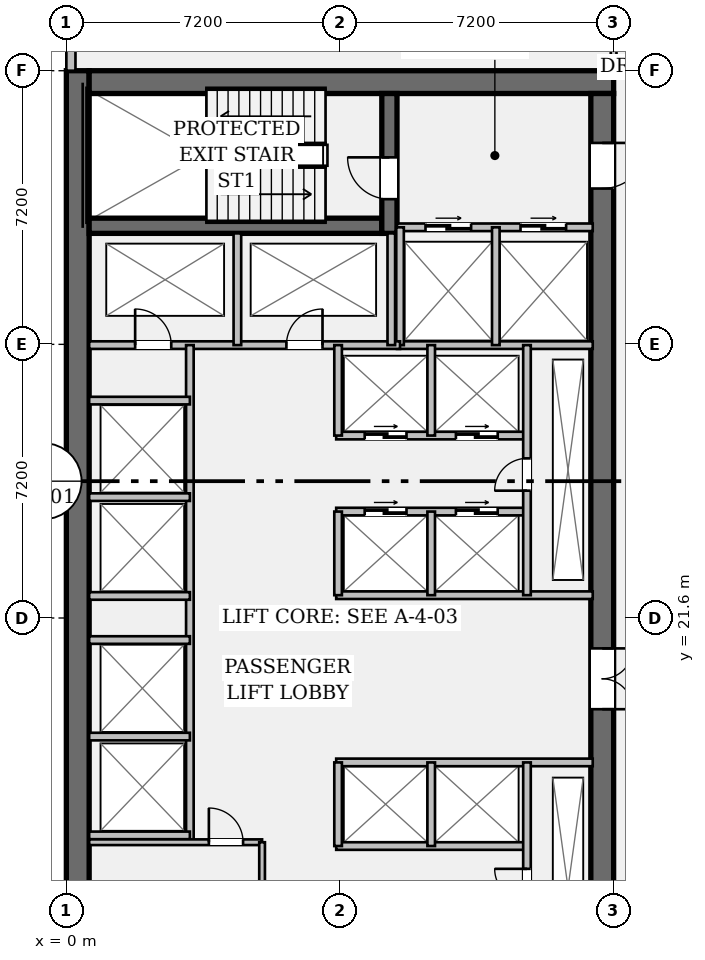
"""IFC4 building model, lengths in metres.
Left out: names, types, materials, properties, quantities, classifications, styles, units other than length and angle.
Written with IfcOpenShell. Run it as: python <this file> out.ifc"""

import sys

from ifc_helpers import new_model, si_unit, direction, frame, frame_2d, origin, place, context, subcontext, project, spatial, rectangle, extrude, element, fill, save


model = new_model("IFC4")
c1 = context("Model", 3, precision=1e-05, world=origin(), true_north=direction((0.0, 1.0)))
c2 = subcontext(c1, "Body", "Model", "MODEL_VIEW")
j1 = project(units=[si_unit("LENGTHUNIT", "METRE"), si_unit("PLANEANGLEUNIT", "RADIAN")], contexts=[c1])
p1 = place(None, origin())
s1 = spatial("IfcSite", under=j1, at=p1, CompositionType="ELEMENT")
p2 = place(p1, origin())
s2 = spatial("IfcBuilding", under=s1, at=p2, CompositionType="ELEMENT")
p3 = place(p2, frame((0.0, 0.0, 17.85)))
s3 = spatial("IfcBuildingStorey", under=s2, at=p3, CompositionType="ELEMENT", Elevation=17.85)
p4 = place(p3, frame((0.3, 7.2, 0.0), z_axis=(0.0, 0.0, 1.0), x_axis=(0.0, 1.0, 0.0)))
e1 = element("IfcWall", 1, at=p4, inside=s3, PredefinedType="SHEAR", context=c2, shape_type="SweptSolid", body=[
    extrude(rectangle(XDim=28.8, YDim=0.6, at=frame_2d((14.4, 0.0))), origin(), (0.0, 0.0, 1.0), 3.91),
])
p5 = place(p3, frame((0.6, 35.7, 0.0), z_axis=(0.0, 0.0, 1.0), x_axis=(1.0, 0.0, 0.0)))
e2 = element("IfcWall", 2, at=p5, inside=s3, PredefinedType="SHEAR", context=c2, shape_type="SweptSolid", body=[
    extrude(rectangle(XDim=13.8, YDim=0.6, at=frame_2d((6.9, 0.0))), origin(), (0.0, 0.0, 1.0), 3.91),
])
p6 = place(p3, frame((14.1, 35.4, 0.0), z_axis=(0.0, 0.0, 1.0), x_axis=(0.0, -1.0, 0.0)))
e3 = element("IfcWall", 3, at=p6, inside=s3, PredefinedType="SHEAR", context=c2, shape_type="SweptSolid", body=[
    extrude(rectangle(XDim=27.6, YDim=0.6, at=frame_2d((13.8, 0.0))), origin(), (0.0, 0.0, 1.0), 3.91),
])
p7 = place(p6, frame((1.3, 0.0, 0.0)))
e4 = element("IfcOpeningElement", 4, at=p7, cuts=e3, PredefinedType="OPENING", context=c2, shape_type="SweptSolid", body=[
    extrude(rectangle(XDim=1.2, YDim=2.15, at=frame_2d((0.6, 1.075))), frame((0.0, 0.312, 0.0), z_axis=(0.0, -1.0, 0.0), x_axis=(1.0, 0.0, 0.0)), (0.0, 0.0, 1.0), 0.624),
])
p8 = place(p6, frame((25.25, 0.0, 0.0)))
e5 = element("IfcOpeningElement", 5, at=p8, cuts=e3, PredefinedType="OPENING", context=c2, shape_type="SweptSolid", body=[
    extrude(rectangle(XDim=1.2, YDim=2.15, at=frame_2d((0.6, 1.075))), frame((0.0, 0.312, 0.0), z_axis=(0.0, -1.0, 0.0), x_axis=(1.0, 0.0, 0.0)), (0.0, 0.0, 1.0), 0.624),
])
p9 = place(p6, frame((14.6, 0.0, 0.0)))
e6 = element("IfcOpeningElement", 6, at=p9, cuts=e3, PredefinedType="OPENING", context=c2, shape_type="SweptSolid", body=[
    extrude(rectangle(XDim=1.6, YDim=2.2, at=frame_2d((0.8, 1.1))), frame((0.0, 0.312, 0.0), z_axis=(0.0, -1.0, 0.0), x_axis=(1.0, 0.0, 0.0)), (0.0, 0.0, 1.0), 0.624),
])
p10 = place(p3, frame((0.6, 31.92, 0.0), z_axis=(0.0, 0.0, 1.0), x_axis=(1.0, 0.0, 0.0)))
e7 = element("IfcWall", 7, at=p10, inside=s3, PredefinedType="SHEAR", context=c2, shape_type="SweptSolid", body=[
    extrude(rectangle(XDim=7.7, YDim=0.4, at=frame_2d((3.85, 0.0))), origin(), (0.0, 0.0, 1.0), 3.91),
])
p11 = place(p3, frame((8.5, 31.72, 0.0), z_axis=(0.0, 0.0, 1.0), x_axis=(0.0, 1.0, 0.0)))
e8 = element("IfcWall", 8, at=p11, inside=s3, PredefinedType="SHEAR", context=c2, shape_type="SweptSolid", body=[
    extrude(rectangle(XDim=3.68, YDim=0.4, at=frame_2d((1.84, 0.0))), origin(), (0.0, 0.0, 1.0), 3.91),
])
p12 = place(p11, frame((0.9, 0.0, 0.0)))
e9 = element("IfcOpeningElement", 9, at=p12, cuts=e8, PredefinedType="OPENING", context=c2, shape_type="SweptSolid", body=[
    extrude(rectangle(XDim=1.1, YDim=2.15, at=frame_2d((0.55, 1.075))), frame((0.0, 0.212, 0.0), z_axis=(0.0, -1.0, 0.0), x_axis=(1.0, 0.0, 0.0)), (0.0, 0.0, 1.0), 0.424),
])
p13 = place(p3, frame((0.12, 36.0, 0.0), z_axis=(0.0, 0.0, 1.0), x_axis=(0.0, 1.0, 0.0)))
e10 = element("IfcWall", 10, at=p13, inside=s3, PredefinedType="STANDARD", context=c2, shape_type="SweptSolid", body=[
    extrude(rectangle(XDim=11.58, YDim=0.24, at=frame_2d((5.79, 0.0))), origin(), (0.0, 0.0, 1.0), 3.91),
])
p14 = place(p13, frame((4.29, 0.0, 0.95)))
e11 = element("IfcOpeningElement", 11, at=p14, cuts=e10, PredefinedType="OPENING", context=c2, shape_type="SweptSolid", body=[
    extrude(rectangle(XDim=3.0, YDim=1.5, at=frame_2d((1.5, 0.75))), frame((0.0, 0.132, 0.0), z_axis=(0.0, -1.0, 0.0), x_axis=(1.0, 0.0, 0.0)), (0.0, 0.0, 1.0), 0.264),
])
p15 = place(p3, frame((8.7, 31.88, 0.0), z_axis=(0.0, 0.0, 1.0), x_axis=(1.0, 0.0, 0.0)))
e12 = element("IfcWall", 12, at=p15, inside=s3, PredefinedType="PARTITIONING", context=c2, shape_type="SweptSolid", body=[
    extrude(rectangle(XDim=5.15, YDim=0.2, at=frame_2d((2.575, 0.0))), origin(), (0.0, 0.0, 1.0), 3.91),
])
p16 = place(p15, frame((0.75, 0.0, 0.0)))
e13 = element("IfcOpeningElement", 13, at=p16, cuts=e12, PredefinedType="OPENING", context=c2, shape_type="SweptSolid", body=[
    extrude(rectangle(XDim=1.2, YDim=2.2, at=frame_2d((0.6, 1.1))), frame((0.0, 0.112, 0.0), z_axis=(0.0, -1.0, 0.0), x_axis=(1.0, 0.0, 0.0)), (0.0, 0.0, 1.0), 0.224),
])
p17 = place(p15, frame((3.25, 0.0, 0.0)))
e14 = element("IfcOpeningElement", 14, at=p17, cuts=e12, PredefinedType="OPENING", context=c2, shape_type="SweptSolid", body=[
    extrude(rectangle(XDim=1.2, YDim=2.2, at=frame_2d((0.6, 1.1))), frame((0.0, 0.112, 0.0), z_axis=(0.0, -1.0, 0.0), x_axis=(1.0, 0.0, 0.0)), (0.0, 0.0, 1.0), 0.224),
])
p18 = place(p3, frame((8.7, 28.78, 0.0), z_axis=(0.0, 0.0, 1.0), x_axis=(1.0, 0.0, 0.0)))
e15 = element("IfcWall", 15, at=p18, inside=s3, PredefinedType="PARTITIONING", context=c2, shape_type="SweptSolid", body=[
    extrude(rectangle(XDim=5.15, YDim=0.2, at=frame_2d((2.575, 0.0))), origin(), (0.0, 0.0, 1.0), 3.91),
])
for number, where, z_axis, x_axis in (
    (16, (8.78, 28.78, 0.0), (0.0, 0.0, 1.0), (0.0, 1.0, 0.0)),
    (17, (11.3, 28.78, 0.0), (0.0, 0.0, 1.0), (0.0, 1.0, 0.0)),
):
    element("IfcWall", number, at=place(p3, frame(where, z_axis=z_axis, x_axis=x_axis)), inside=s3, PredefinedType="PARTITIONING", context=c2, shape_type="SweptSolid", body=[
        extrude(rectangle(XDim=3.1, YDim=0.2, at=frame_2d((1.55, 0.0))), origin(), (0.0, 0.0, 1.0), 3.91),
    ])
p19 = place(p3, frame((0.6, 28.78, 0.0), z_axis=(0.0, 0.0, 1.0), x_axis=(1.0, 0.0, 0.0)))
e18 = element("IfcWall", 18, at=p19, inside=s3, PredefinedType="PARTITIONING", context=c2, shape_type="SweptSolid", body=[
    extrude(rectangle(XDim=8.18, YDim=0.2, at=frame_2d((4.09, 0.0))), origin(), (0.0, 0.0, 1.0), 3.91),
])
p20 = place(p19, frame((1.21, 0.0, 0.0)))
e19 = element("IfcOpeningElement", 19, at=p20, cuts=e18, PredefinedType="OPENING", context=c2, shape_type="SweptSolid", body=[
    extrude(rectangle(XDim=0.95, YDim=2.15, at=frame_2d((0.475, 1.075))), frame((0.0, 0.112, 0.0), z_axis=(0.0, -1.0, 0.0), x_axis=(1.0, 0.0, 0.0)), (0.0, 0.0, 1.0), 0.224),
])
p21 = place(p19, frame((5.19, 0.0, 0.0)))
e20 = element("IfcOpeningElement", 20, at=p21, cuts=e18, PredefinedType="OPENING", context=c2, shape_type="SweptSolid", body=[
    extrude(rectangle(XDim=0.95, YDim=2.15, at=frame_2d((0.475, 1.075))), frame((0.0, 0.112, 0.0), z_axis=(0.0, -1.0, 0.0), x_axis=(1.0, 0.0, 0.0)), (0.0, 0.0, 1.0), 0.224),
])
for number, where, z_axis, x_axis in (
    (21, (4.5, 28.78, 0.0), (0.0, 0.0, 1.0), (0.0, 1.0, 0.0)),
    (22, (8.55, 28.78, 0.0), (0.0, 0.0, 1.0), (0.0, 1.0, 0.0)),
):
    element("IfcWall", number, at=place(p3, frame(where, z_axis=z_axis, x_axis=x_axis)), inside=s3, PredefinedType="PARTITIONING", context=c2, shape_type="SweptSolid", body=[
        extrude(rectangle(XDim=2.94, YDim=0.2, at=frame_2d((1.47, 0.0))), origin(), (0.0, 0.0, 1.0), 3.91),
    ])
p22 = place(p3, frame((3.25, 15.7, 0.0), z_axis=(0.0, 0.0, 1.0), x_axis=(0.0, 1.0, 0.0)))
e23 = element("IfcWall", 23, at=p22, inside=s3, PredefinedType="PARTITIONING", context=c2, shape_type="SweptSolid", body=[
    extrude(rectangle(XDim=13.08, YDim=0.2, at=frame_2d((6.54, 0.0))), origin(), (0.0, 0.0, 1.0), 3.91),
])
for number, where, z_axis, x_axis in (
    (24, (0.6, 15.88, 0.0), (0.0, 0.0, 1.0), (1.0, 0.0, 0.0)),
    (25, (0.6, 18.48, 0.0), (0.0, 0.0, 1.0), (1.0, 0.0, 0.0)),
    (26, (0.6, 22.18, 0.0), (0.0, 0.0, 1.0), (1.0, 0.0, 0.0)),
    (27, (0.6, 24.78, 0.0), (0.0, 0.0, 1.0), (1.0, 0.0, 0.0)),
    (28, (0.6, 21.02, 0.0), (0.0, 0.0, 1.0), (1.0, 0.0, 0.0)),
    (29, (0.6, 27.32, 0.0), (0.0, 0.0, 1.0), (1.0, 0.0, 0.0)),
):
    element("IfcWall", number, at=place(p3, frame(where, z_axis=z_axis, x_axis=x_axis)), inside=s3, PredefinedType="PARTITIONING", context=c2, shape_type="SweptSolid", body=[
        extrude(rectangle(XDim=2.65, YDim=0.2, at=frame_2d((1.325, 0.0))), origin(), (0.0, 0.0, 1.0), 3.91),
    ])
p23 = place(p3, frame((7.1, 22.2, 0.0), z_axis=(0.0, 0.0, 1.0), x_axis=(1.0, 0.0, 0.0)))
e30 = element("IfcWall", 30, at=p23, inside=s3, PredefinedType="PARTITIONING", context=c2, shape_type="SweptSolid", body=[
    extrude(rectangle(XDim=6.75, YDim=0.2, at=frame_2d((3.375, 0.0))), origin(), (0.0, 0.0, 1.0), 3.91),
])
p24 = place(p3, frame((7.1, 24.4, 0.0), z_axis=(0.0, 0.0, 1.0), x_axis=(1.0, 0.0, 0.0)))
e31 = element("IfcWall", 31, at=p24, inside=s3, PredefinedType="PARTITIONING", context=c2, shape_type="SweptSolid", body=[
    extrude(rectangle(XDim=5.02, YDim=0.2, at=frame_2d((2.51, 0.0))), origin(), (0.0, 0.0, 1.0), 3.91),
])
p25 = place(p24, frame((0.75, 0.0, 0.0)))
e32 = element("IfcOpeningElement", 32, at=p25, cuts=e31, PredefinedType="OPENING", context=c2, shape_type="SweptSolid", body=[
    extrude(rectangle(XDim=1.1, YDim=2.2, at=frame_2d((0.55, 1.1))), frame((0.0, 0.112, 0.0), z_axis=(0.0, -1.0, 0.0), x_axis=(1.0, 0.0, 0.0)), (0.0, 0.0, 1.0), 0.224),
])
p26 = place(p24, frame((3.15, 0.0, 0.0)))
e33 = element("IfcOpeningElement", 33, at=p26, cuts=e31, PredefinedType="OPENING", context=c2, shape_type="SweptSolid", body=[
    extrude(rectangle(XDim=1.1, YDim=2.2, at=frame_2d((0.55, 1.1))), frame((0.0, 0.112, 0.0), z_axis=(0.0, -1.0, 0.0), x_axis=(1.0, 0.0, 0.0)), (0.0, 0.0, 1.0), 0.224),
])
p27 = place(p3, frame((7.1, 26.4, 0.0), z_axis=(0.0, 0.0, 1.0), x_axis=(1.0, 0.0, 0.0)))
e34 = element("IfcWall", 34, at=p27, inside=s3, PredefinedType="PARTITIONING", context=c2, shape_type="SweptSolid", body=[
    extrude(rectangle(XDim=5.02, YDim=0.2, at=frame_2d((2.51, 0.0))), origin(), (0.0, 0.0, 1.0), 3.91),
])
p28 = place(p27, frame((0.75, 0.0, 0.0)))
e35 = element("IfcOpeningElement", 35, at=p28, cuts=e34, PredefinedType="OPENING", context=c2, shape_type="SweptSolid", body=[
    extrude(rectangle(XDim=1.1, YDim=2.2, at=frame_2d((0.55, 1.1))), frame((0.0, 0.112, 0.0), z_axis=(0.0, -1.0, 0.0), x_axis=(1.0, 0.0, 0.0)), (0.0, 0.0, 1.0), 0.224),
])
p29 = place(p27, frame((3.15, 0.0, 0.0)))
e36 = element("IfcOpeningElement", 36, at=p29, cuts=e34, PredefinedType="OPENING", context=c2, shape_type="SweptSolid", body=[
    extrude(rectangle(XDim=1.1, YDim=2.2, at=frame_2d((0.55, 1.1))), frame((0.0, 0.112, 0.0), z_axis=(0.0, -1.0, 0.0), x_axis=(1.0, 0.0, 0.0)), (0.0, 0.0, 1.0), 0.224),
])
p30 = place(p3, frame((7.15, 22.2, 0.0), z_axis=(0.0, 0.0, 1.0), x_axis=(0.0, 1.0, 0.0)))
e37 = element("IfcWall", 37, at=p30, inside=s3, PredefinedType="PARTITIONING", context=c2, shape_type="SweptSolid", body=[
    extrude(rectangle(XDim=2.2, YDim=0.2, at=frame_2d((1.1, 0.0))), origin(), (0.0, 0.0, 1.0), 3.91),
])
p31 = place(p3, frame((7.15, 26.4, 0.0), z_axis=(0.0, 0.0, 1.0), x_axis=(0.0, 1.0, 0.0)))
e38 = element("IfcWall", 38, at=p31, inside=s3, PredefinedType="PARTITIONING", context=c2, shape_type="SweptSolid", body=[
    extrude(rectangle(XDim=2.38, YDim=0.2, at=frame_2d((1.19, 0.0))), origin(), (0.0, 0.0, 1.0), 3.91),
])
p32 = place(p3, frame((9.6, 22.2, 0.0), z_axis=(0.0, 0.0, 1.0), x_axis=(0.0, 1.0, 0.0)))
e39 = element("IfcWall", 39, at=p32, inside=s3, PredefinedType="PARTITIONING", context=c2, shape_type="SweptSolid", body=[
    extrude(rectangle(XDim=2.2, YDim=0.2, at=frame_2d((1.1, 0.0))), origin(), (0.0, 0.0, 1.0), 3.91),
])
p33 = place(p3, frame((9.6, 26.4, 0.0), z_axis=(0.0, 0.0, 1.0), x_axis=(0.0, 1.0, 0.0)))
e40 = element("IfcWall", 40, at=p33, inside=s3, PredefinedType="PARTITIONING", context=c2, shape_type="SweptSolid", body=[
    extrude(rectangle(XDim=2.38, YDim=0.2, at=frame_2d((1.19, 0.0))), origin(), (0.0, 0.0, 1.0), 3.91),
])
p34 = place(p3, frame((12.12, 22.2, 0.0), z_axis=(0.0, 0.0, 1.0), x_axis=(0.0, 1.0, 0.0)))
e41 = element("IfcWall", 41, at=p34, inside=s3, PredefinedType="PARTITIONING", context=c2, shape_type="SweptSolid", body=[
    extrude(rectangle(XDim=6.58, YDim=0.2, at=frame_2d((3.29, 0.0))), origin(), (0.0, 0.0, 1.0), 3.91),
])
p35 = place(p34, frame((2.75, 0.0, 0.0)))
e42 = element("IfcOpeningElement", 42, at=p35, cuts=e41, PredefinedType="OPENING", context=c2, shape_type="SweptSolid", body=[
    extrude(rectangle(XDim=0.85, YDim=2.15, at=frame_2d((0.425, 1.075))), frame((0.0, 0.112, 0.0), z_axis=(0.0, -1.0, 0.0), x_axis=(1.0, 0.0, 0.0)), (0.0, 0.0, 1.0), 0.224),
])
p36 = place(p3, frame((7.1, 17.8, 0.0), z_axis=(0.0, 0.0, 1.0), x_axis=(1.0, 0.0, 0.0)))
e43 = element("IfcWall", 43, at=p36, inside=s3, PredefinedType="PARTITIONING", context=c2, shape_type="SweptSolid", body=[
    extrude(rectangle(XDim=6.75, YDim=0.2, at=frame_2d((3.375, 0.0))), origin(), (0.0, 0.0, 1.0), 3.91),
])
p37 = place(p3, frame((7.1, 15.6, 0.0), z_axis=(0.0, 0.0, 1.0), x_axis=(1.0, 0.0, 0.0)))
e44 = element("IfcWall", 44, at=p37, inside=s3, PredefinedType="PARTITIONING", context=c2, shape_type="SweptSolid", body=[
    extrude(rectangle(XDim=5.02, YDim=0.2, at=frame_2d((2.51, 0.0))), origin(), (0.0, 0.0, 1.0), 3.91),
])
for number, where, z_axis, x_axis in (
    (45, (7.15, 15.6, 0.0), (0.0, 0.0, 1.0), (0.0, 1.0, 0.0)),
    (46, (9.6, 15.6, 0.0), (0.0, 0.0, 1.0), (0.0, 1.0, 0.0)),
):
    element("IfcWall", number, at=place(p3, frame(where, z_axis=z_axis, x_axis=x_axis)), inside=s3, PredefinedType="PARTITIONING", context=c2, shape_type="SweptSolid", body=[
        extrude(rectangle(XDim=2.2, YDim=0.2, at=frame_2d((1.1, 0.0))), origin(), (0.0, 0.0, 1.0), 3.91),
    ])
p38 = place(p3, frame((12.12, 11.2, 0.0), z_axis=(0.0, 0.0, 1.0), x_axis=(0.0, 1.0, 0.0)))
e47 = element("IfcWall", 47, at=p38, inside=s3, PredefinedType="PARTITIONING", context=c2, shape_type="SweptSolid", body=[
    extrude(rectangle(XDim=6.6, YDim=0.2, at=frame_2d((3.3, 0.0))), origin(), (0.0, 0.0, 1.0), 3.91),
])
p39 = place(p38, frame((2.95, 0.0, 0.0)))
e48 = element("IfcOpeningElement", 48, at=p39, cuts=e47, PredefinedType="OPENING", context=c2, shape_type="SweptSolid", body=[
    extrude(rectangle(XDim=0.85, YDim=2.15, at=frame_2d((0.425, 1.075))), frame((0.0, 0.112, 0.0), z_axis=(0.0, -1.0, 0.0), x_axis=(1.0, 0.0, 0.0)), (0.0, 0.0, 1.0), 0.224),
])
p40 = place(p3, frame((0.6, 15.7, 0.0), z_axis=(0.0, 0.0, 1.0), x_axis=(1.0, 0.0, 0.0)))
e49 = element("IfcWall", 49, at=p40, inside=s3, PredefinedType="PARTITIONING", context=c2, shape_type="SweptSolid", body=[
    extrude(rectangle(XDim=4.55, YDim=0.15, at=frame_2d((2.275, 0.0))), origin(), (0.0, 0.0, 1.0), 3.91),
])
p41 = place(p40, frame((3.15, 0.0, 0.0)))
e50 = element("IfcOpeningElement", 50, at=p41, cuts=e49, PredefinedType="OPENING", context=c2, shape_type="SweptSolid", body=[
    extrude(rectangle(XDim=0.9, YDim=2.15, at=frame_2d((0.45, 1.075))), frame((0.0, 0.087, 0.0), z_axis=(0.0, -1.0, 0.0), x_axis=(1.0, 0.0, 0.0)), (0.0, 0.0, 1.0), 0.174),
])
p42 = place(p3, frame((5.15, 11.28, 0.0), z_axis=(0.0, 0.0, 1.0), x_axis=(0.0, 1.0, 0.0)))
e51 = element("IfcWall", 51, at=p42, inside=s3, PredefinedType="PARTITIONING", context=c2, shape_type="SweptSolid", body=[
    extrude(rectangle(XDim=4.42, YDim=0.15, at=frame_2d((2.21, 0.0))), origin(), (0.0, 0.0, 1.0), 3.91),
])
p43 = place(p3, frame((14.4, 36.0, 0.0), z_axis=(0.0, 0.0, 1.0), x_axis=(0.0, 1.0, 0.0)))
e52 = element("IfcWall", 52, at=p43, inside=s3, PredefinedType="PARTITIONING", context=c2, shape_type="SweptSolid", body=[
    extrude(rectangle(XDim=7.9, YDim=0.15, at=frame_2d((3.95, 0.0))), origin(), (0.0, 0.0, 1.0), 2.968),
])
p44 = place(p43, frame((2.6, 0.0, 0.0)))
e53 = element("IfcOpeningElement", 53, at=p44, cuts=e52, PredefinedType="OPENING", context=c2, shape_type="SweptSolid", body=[
    extrude(rectangle(XDim=1.0, YDim=2.15, at=frame_2d((0.5, 1.075))), frame((0.0, 0.087, 0.0), z_axis=(0.0, -1.0, 0.0), x_axis=(1.0, 0.0, 0.0)), (0.0, 0.0, 1.0), 0.174),
])
p45 = place(p12, origin())
e54 = element("IfcDoor", 54, at=p45, inside=s3, OperationType="SINGLE_SWING_RIGHT", PredefinedType="DOOR", context=c2, shape_type="SweptSolid", body=[
    extrude(rectangle(XDim=1.1, YDim=2.15, at=frame_2d((0.55, 1.075))), frame((0.0, 0.025, 0.0), z_axis=(0.0, -1.0, 0.0), x_axis=(1.0, 0.0, 0.0)), (0.0, 0.0, 1.0), 0.05),
])
fill(e9, e54)
p46 = place(p7, origin())
e55 = element("IfcDoor", 55, at=p46, inside=s3, OperationType="SINGLE_SWING_LEFT", PredefinedType="DOOR", context=c2, shape_type="SweptSolid", body=[
    extrude(rectangle(XDim=1.2, YDim=2.15, at=frame_2d((0.6, 1.075))), frame((0.0, 0.025, 0.0), z_axis=(0.0, -1.0, 0.0), x_axis=(1.0, 0.0, 0.0)), (0.0, 0.0, 1.0), 0.05),
])
fill(e4, e55)
p47 = place(p16, origin())
e56 = element("IfcDoor", 56, at=p47, inside=s3, OperationType="DOUBLE_DOOR_SLIDING", PredefinedType="DOOR", context=c2, shape_type="SweptSolid", body=[
    extrude(rectangle(XDim=1.2, YDim=2.2, at=frame_2d((0.6, 1.1))), frame((0.0, 0.025, 0.0), z_axis=(0.0, -1.0, 0.0), x_axis=(1.0, 0.0, 0.0)), (0.0, 0.0, 1.0), 0.05),
])
fill(e13, e56)
p48 = place(p17, origin())
e57 = element("IfcDoor", 57, at=p48, inside=s3, OperationType="DOUBLE_DOOR_SLIDING", PredefinedType="DOOR", context=c2, shape_type="SweptSolid", body=[
    extrude(rectangle(XDim=1.2, YDim=2.2, at=frame_2d((0.6, 1.1))), frame((0.0, 0.025, 0.0), z_axis=(0.0, -1.0, 0.0), x_axis=(1.0, 0.0, 0.0)), (0.0, 0.0, 1.0), 0.05),
])
fill(e14, e57)
p49 = place(p20, origin())
e58 = element("IfcDoor", 58, at=p49, inside=s3, OperationType="SINGLE_SWING_LEFT", PredefinedType="DOOR", context=c2, shape_type="SweptSolid", body=[
    extrude(rectangle(XDim=0.95, YDim=2.15, at=frame_2d((0.475, 1.075))), frame((0.0, 0.025, 0.0), z_axis=(0.0, -1.0, 0.0), x_axis=(1.0, 0.0, 0.0)), (0.0, 0.0, 1.0), 0.05),
])
fill(e19, e58)
p50 = place(p21, origin())
e59 = element("IfcDoor", 59, at=p50, inside=s3, OperationType="SINGLE_SWING_RIGHT", PredefinedType="DOOR", context=c2, shape_type="SweptSolid", body=[
    extrude(rectangle(XDim=0.95, YDim=2.15, at=frame_2d((0.475, 1.075))), frame((0.0, 0.025, 0.0), z_axis=(0.0, -1.0, 0.0), x_axis=(1.0, 0.0, 0.0)), (0.0, 0.0, 1.0), 0.05),
])
fill(e20, e59)
p51 = place(p9, origin())
e60 = element("IfcDoor", 60, at=p51, inside=s3, OperationType="DOUBLE_DOOR_SINGLE_SWING", PredefinedType="DOOR", context=c2, shape_type="SweptSolid", body=[
    extrude(rectangle(XDim=1.6, YDim=2.2, at=frame_2d((0.8, 1.1))), frame((0.0, 0.025, 0.0), z_axis=(0.0, -1.0, 0.0), x_axis=(1.0, 0.0, 0.0)), (0.0, 0.0, 1.0), 0.05),
])
fill(e6, e60)
p52 = place(p35, origin())
e61 = element("IfcDoor", 61, at=p52, inside=s3, OperationType="SINGLE_SWING_LEFT", PredefinedType="DOOR", context=c2, shape_type="SweptSolid", body=[
    extrude(rectangle(XDim=0.85, YDim=2.15, at=frame_2d((0.425, 1.075))), frame((0.0, 0.025, 0.0), z_axis=(0.0, -1.0, 0.0), x_axis=(1.0, 0.0, 0.0)), (0.0, 0.0, 1.0), 0.05),
])
fill(e42, e61)
p53 = place(p25, origin())
e62 = element("IfcDoor", 62, at=p53, inside=s3, OperationType="DOUBLE_DOOR_SLIDING", PredefinedType="DOOR", context=c2, shape_type="SweptSolid", body=[
    extrude(rectangle(XDim=1.1, YDim=2.2, at=frame_2d((0.55, 1.1))), frame((0.0, 0.025, 0.0), z_axis=(0.0, -1.0, 0.0), x_axis=(1.0, 0.0, 0.0)), (0.0, 0.0, 1.0), 0.05),
])
fill(e32, e62)
p54 = place(p26, origin())
e63 = element("IfcDoor", 63, at=p54, inside=s3, OperationType="DOUBLE_DOOR_SLIDING", PredefinedType="DOOR", context=c2, shape_type="SweptSolid", body=[
    extrude(rectangle(XDim=1.1, YDim=2.2, at=frame_2d((0.55, 1.1))), frame((0.0, 0.025, 0.0), z_axis=(0.0, -1.0, 0.0), x_axis=(1.0, 0.0, 0.0)), (0.0, 0.0, 1.0), 0.05),
])
fill(e33, e63)
p55 = place(p28, origin())
e64 = element("IfcDoor", 64, at=p55, inside=s3, OperationType="DOUBLE_DOOR_SLIDING", PredefinedType="DOOR", context=c2, shape_type="SweptSolid", body=[
    extrude(rectangle(XDim=1.1, YDim=2.2, at=frame_2d((0.55, 1.1))), frame((0.0, 0.025, 0.0), z_axis=(0.0, -1.0, 0.0), x_axis=(1.0, 0.0, 0.0)), (0.0, 0.0, 1.0), 0.05),
])
fill(e35, e64)
p56 = place(p29, origin())
e65 = element("IfcDoor", 65, at=p56, inside=s3, OperationType="DOUBLE_DOOR_SLIDING", PredefinedType="DOOR", context=c2, shape_type="SweptSolid", body=[
    extrude(rectangle(XDim=1.1, YDim=2.2, at=frame_2d((0.55, 1.1))), frame((0.0, 0.025, 0.0), z_axis=(0.0, -1.0, 0.0), x_axis=(1.0, 0.0, 0.0)), (0.0, 0.0, 1.0), 0.05),
])
fill(e36, e65)
p57 = place(p39, origin())
e66 = element("IfcDoor", 66, at=p57, inside=s3, OperationType="SINGLE_SWING_RIGHT", PredefinedType="DOOR", context=c2, shape_type="SweptSolid", body=[
    extrude(rectangle(XDim=0.85, YDim=2.15, at=frame_2d((0.425, 1.075))), frame((0.0, 0.025, 0.0), z_axis=(0.0, -1.0, 0.0), x_axis=(1.0, 0.0, 0.0)), (0.0, 0.0, 1.0), 0.05),
])
fill(e48, e66)
p58 = place(p41, origin())
e67 = element("IfcDoor", 67, at=p58, inside=s3, OperationType="SINGLE_SWING_LEFT", PredefinedType="DOOR", context=c2, shape_type="SweptSolid", body=[
    extrude(rectangle(XDim=0.9, YDim=2.15, at=frame_2d((0.45, 1.075))), frame((0.0, 0.025, 0.0), z_axis=(0.0, -1.0, 0.0), x_axis=(1.0, 0.0, 0.0)), (0.0, 0.0, 1.0), 0.05),
])
fill(e50, e67)
save(model, sys.argv[1])
